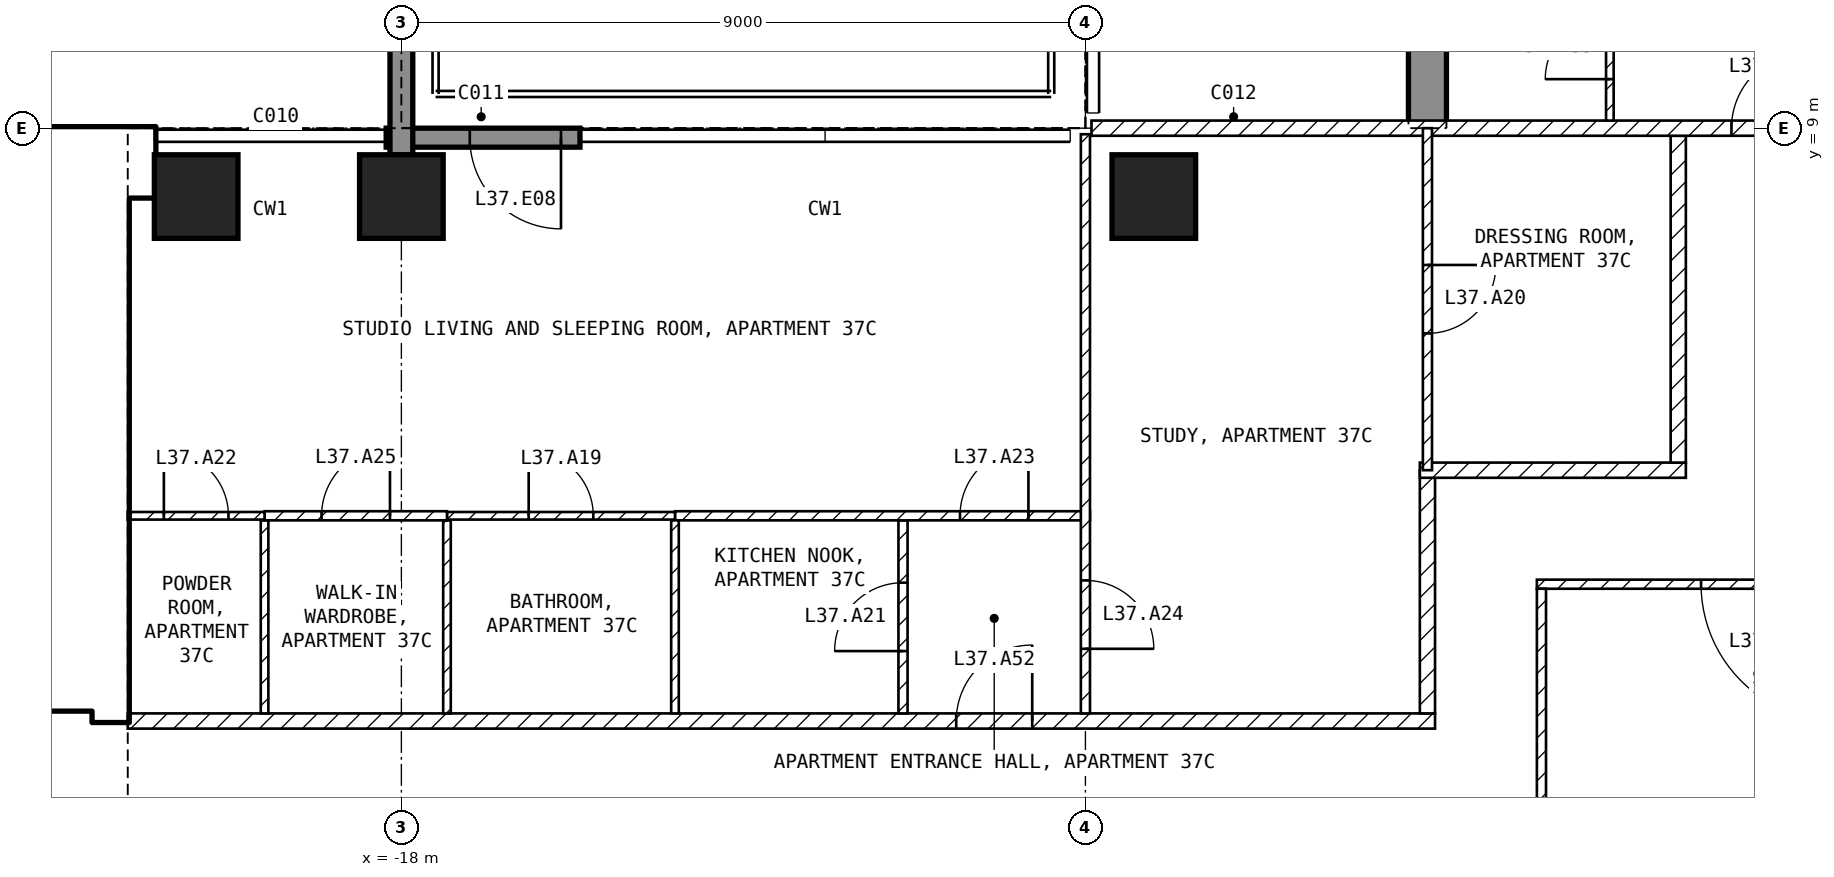
"""IFC4 building model, lengths in metres.
Left out: names, types, materials, properties, quantities, classifications, styles, units other than length and angle.
Written with IfcOpenShell. Run it as: python <this file> out.ifc"""

import sys

from ifc_helpers import new_model, si_unit, direction, frame, frame_2d, origin, origin_2d, place, context, subcontext, project, spatial, polyline, rectangle, outline, extrude, element, fill, save


model = new_model("IFC4")
c1 = context("Model", 3, precision=1e-05, world=origin(), true_north=direction((0.0, 1.0)))
c2 = subcontext(c1, "Body", "Model", "MODEL_VIEW")
j1 = project(units=[si_unit("LENGTHUNIT", "METRE"), si_unit("PLANEANGLEUNIT", "RADIAN")], contexts=[c1])
p1 = place(None, origin())
s1 = spatial("IfcSite", under=j1, at=p1, CompositionType="ELEMENT")
p2 = place(p1, origin())
s2 = spatial("IfcBuilding", under=s1, at=p2, CompositionType="ELEMENT")
p3 = place(p2, frame((0.0, 0.0, 151.4)))
s3 = spatial("IfcBuildingStorey", under=s2, at=p3, CompositionType="ELEMENT", Elevation=151.4)
for number, where, z_axis, x_axis in (
    (1, (-20.7, 8.1, -0.25), (0.0, 0.0, 1.0), (1.0, 0.0, 0.0)),
    (2, (-18.0, 8.1, -0.25), (0.0, 0.0, 1.0), (1.0, 0.0, 0.0)),
    (3, (-8.1, 8.1, -0.25), (0.0, 0.0, 1.0), (1.0, 0.0, 0.0)),
):
    element("IfcColumn", number, at=place(p3, frame(where, z_axis=z_axis, x_axis=x_axis)), inside=s3, PredefinedType="COLUMN", context=c2, shape_type="SweptSolid", body=[
        extrude(rectangle(XDim=1.1, YDim=1.1, at=origin_2d()), origin(), (0.0, 0.0, 1.0), 3.45),
    ])
p4 = place(p3, frame((-4.75, 9.0, -0.25), z_axis=(1.0, 0.0, 0.0), x_axis=(0.0, 1.0, 0.0)))
e4 = element("IfcWall", 4, at=p4, inside=s3, PredefinedType="SHEAR", context=c2, shape_type="SweptSolid", body=[
    extrude(outline(polyline([(0.0, 0.0), (2.1, 0.0), (2.1, 2.65), (4.5, 2.65), (4.5, 0.0), (9.9, 0.0), (9.9, 2.65), (12.3, 2.65), (12.3, 0.0), (16.55, 0.0), (16.55, 3.45), (0.0, 3.45), (0.0, 0.0)])), origin(), (0.0, 0.0, 1.0), 0.5),
])
p5 = place(p3, frame((-15.65, 8.875, 0.0), z_axis=(0.0, 0.0, 1.0), x_axis=(-1.0, 0.0, 0.0)))
e5 = element("IfcWall", 5, at=p5, inside=s3, PredefinedType="SOLIDWALL", context=c2, shape_type="SweptSolid", body=[
    extrude(rectangle(XDim=2.55, YDim=0.25, at=frame_2d((1.275, 0.0))), origin(), (0.0, 0.0, 1.0), 3.2),
])
p6 = place(p5, frame((0.25, 0.0, 0.0)))
e6 = element("IfcOpeningElement", 6, at=p6, cuts=e5, PredefinedType="OPENING", context=c2, shape_type="SweptSolid", body=[
    extrude(rectangle(XDim=1.2, YDim=2.4, at=frame_2d((0.6, 1.2))), frame((0.0, 0.135, 0.0), z_axis=(0.0, -1.0, 0.0), x_axis=(1.0, 0.0, 0.0)), (0.0, 0.0, 1.0), 0.27),
])
p7 = place(p3, frame((-18.0, 8.65, 0.0), z_axis=(0.0, 0.0, 1.0), x_axis=(0.0, 1.0, 0.0)))
e7 = element("IfcWall", 7, at=p7, inside=s3, PredefinedType="SOLIDWALL", context=c2, shape_type="SweptSolid", body=[
    extrude(rectangle(XDim=3.09, YDim=0.3, at=frame_2d((1.545, 0.0))), origin(), (0.0, 0.0, 1.0), 3.2),
])
p8 = place(p3, frame((-29.45, 8.55, 0.0), z_axis=(0.0, 0.0, 1.0), x_axis=(1.0, 0.0, 0.0)))
e8 = element("IfcWall", 8, at=p8, inside=s3, PredefinedType="SHEAR", context=c2, shape_type="SweptSolid", body=[
    extrude(rectangle(XDim=8.2, YDim=0.9, at=frame_2d((4.1, 0.0))), origin(), (0.0, 0.0, 1.0), 3.2),
])
p9 = place(p3, frame((-21.825, 1.2, 0.0), z_axis=(0.0, 0.0, 1.0), x_axis=(0.0, 1.0, 0.0)))
e9 = element("IfcWall", 9, at=p9, inside=s3, PredefinedType="SHEAR", context=c2, shape_type="SweptSolid", body=[
    extrude(rectangle(XDim=6.9, YDim=0.45, at=frame_2d((3.45, 0.0))), origin(), (0.0, 0.0, 1.0), 3.2),
])
p10 = place(p3, frame((-33.05, 1.45, 0.0), z_axis=(0.0, 0.0, 1.0), x_axis=(1.0, 0.0, 0.0)))
e10 = element("IfcWall", 10, at=p10, inside=s3, PredefinedType="SOLIDWALL", context=c2, shape_type="SweptSolid", body=[
    extrude(rectangle(XDim=11.0, YDim=0.2, at=frame_2d((5.5, 0.0))), origin(), (0.0, 0.0, 1.0), 3.2),
])
p11 = place(p10, frame((9.25, 0.0, 0.0)))
e11 = element("IfcOpeningElement", 11, at=p11, cuts=e10, PredefinedType="OPENING", context=c2, shape_type="SweptSolid", body=[
    extrude(rectangle(XDim=1.0, YDim=2.1, at=frame_2d((0.5, 1.05))), frame((0.0, 0.11, 0.0), z_axis=(0.0, -1.0, 0.0), x_axis=(1.0, 0.0, 0.0)), (0.0, 0.0, 1.0), 0.22),
])
p12 = place(p10, frame((6.75, 0.0, 0.0)))
e12 = element("IfcOpeningElement", 12, at=p12, cuts=e10, PredefinedType="OPENING", context=c2, shape_type="SweptSolid", body=[
    extrude(rectangle(XDim=1.0, YDim=2.1, at=frame_2d((0.5, 1.05))), frame((0.0, 0.11, 0.0), z_axis=(0.0, -1.0, 0.0), x_axis=(1.0, 0.0, 0.0)), (0.0, 0.0, 1.0), 0.22),
])
p13 = place(p10, frame((1.025, 0.0, 0.0)))
e13 = element("IfcOpeningElement", 13, at=p13, cuts=e10, PredefinedType="OPENING", context=c2, shape_type="SweptSolid", body=[
    extrude(rectangle(XDim=0.9, YDim=2.1, at=frame_2d((0.45, 1.05))), frame((0.0, 0.11, 0.0), z_axis=(0.0, -1.0, 0.0), x_axis=(1.0, 0.0, 0.0)), (0.0, 0.0, 1.0), 0.22),
])
p14 = place(p3, frame((-28.35, 5.15, 0.0), z_axis=(0.0, 0.0, 1.0), x_axis=(1.0, 0.0, 0.0)))
e14 = element("IfcWall", 14, at=p14, inside=s3, PredefinedType="SOLIDWALL", context=c2, shape_type="SweptSolid", body=[
    extrude(rectangle(XDim=6.3, YDim=0.2, at=frame_2d((3.15, 0.0))), origin(), (0.0, 0.0, 1.0), 3.2),
])
p15 = place(p14, frame((5.1, 0.0, 0.0)))
e15 = element("IfcOpeningElement", 15, at=p15, cuts=e14, PredefinedType="OPENING", context=c2, shape_type="SweptSolid", body=[
    extrude(rectangle(XDim=1.0, YDim=2.1, at=frame_2d((0.5, 1.05))), frame((0.0, 0.11, 0.0), z_axis=(0.0, -1.0, 0.0), x_axis=(1.0, 0.0, 0.0)), (0.0, 0.0, 1.0), 0.22),
])
p16 = place(p3, frame((3.06, 3.0, 0.0), z_axis=(0.0, 0.0, 1.0), x_axis=(-1.0, 0.0, 0.0)))
e16 = element("IfcWall", 16, at=p16, inside=s3, PredefinedType="PARTITIONING", context=c2, shape_type="SweptSolid", body=[
    extrude(rectangle(XDim=6.12, YDim=0.12, at=frame_2d((3.06, 0.0))), origin(), (0.0, 0.0, 1.0), 3.2),
])
p17 = place(p16, frame((2.16, 0.0, 0.0)))
e17 = element("IfcOpeningElement", 17, at=p17, cuts=e16, PredefinedType="OPENING", context=c2, shape_type="SweptSolid", body=[
    extrude(rectangle(XDim=1.8, YDim=2.1, at=frame_2d((0.9, 1.05))), frame((0.0, 0.07, 0.0), z_axis=(0.0, -1.0, 0.0), x_axis=(1.0, 0.0, 0.0)), (0.0, 0.0, 1.0), 0.14),
])
p18 = place(p3, frame((-3.0, 2.94, 0.0), z_axis=(0.0, 0.0, 1.0), x_axis=(0.0, -1.0, 0.0)))
e18 = element("IfcWall", 18, at=p18, inside=s3, PredefinedType="PARTITIONING", context=c2, shape_type="SweptSolid", body=[
    extrude(rectangle(XDim=5.88, YDim=0.12, at=frame_2d((2.94, 0.0))), origin(), (0.0, 0.0, 1.0), 3.2),
])
p19 = place(p3, frame((-21.6, 1.2, 0.0), z_axis=(0.0, 0.0, 1.0), x_axis=(1.0, 0.0, 0.0)))
e19 = element("IfcWall", 19, at=p19, inside=s3, PredefinedType="PARTITIONING", context=c2, shape_type="SweptSolid", body=[
    extrude(rectangle(XDim=17.2, YDim=0.2, at=frame_2d((8.6, 0.0))), origin(), (0.0, 0.0, 1.0), 3.2),
])
p20 = place(p19, frame((10.9, 0.0, 0.0)))
e20 = element("IfcOpeningElement", 20, at=p20, cuts=e19, PredefinedType="OPENING", context=c2, shape_type="SweptSolid", body=[
    extrude(rectangle(XDim=1.0, YDim=2.1, at=frame_2d((0.5, 1.05))), frame((0.0, 0.11, 0.0), z_axis=(0.0, -1.0, 0.0), x_axis=(1.0, 0.0, 0.0)), (0.0, 0.0, 1.0), 0.22),
])
p21 = place(p3, frame((-4.5, 1.3, 0.0), z_axis=(0.0, 0.0, 1.0), x_axis=(0.0, 1.0, 0.0)))
e21 = element("IfcWall", 21, at=p21, inside=s3, PredefinedType="PARTITIONING", context=c2, shape_type="SweptSolid", body=[
    extrude(rectangle(XDim=3.2, YDim=0.2, at=frame_2d((1.6, 0.0))), origin(), (0.0, 0.0, 1.0), 3.2),
])
p22 = place(p3, frame((-4.6, 4.5, 0.0), z_axis=(0.0, 0.0, 1.0), x_axis=(1.0, 0.0, 0.0)))
e22 = element("IfcWall", 22, at=p22, inside=s3, PredefinedType="PARTITIONING", context=c2, shape_type="SweptSolid", body=[
    extrude(rectangle(XDim=3.5, YDim=0.2, at=frame_2d((1.75, 0.0))), origin(), (0.0, 0.0, 1.0), 3.2),
])
p23 = place(p3, frame((-1.2, 4.6, 0.0), z_axis=(0.0, 0.0, 1.0), x_axis=(0.0, 1.0, 0.0)))
e23 = element("IfcWall", 23, at=p23, inside=s3, PredefinedType="PARTITIONING", context=c2, shape_type="SweptSolid", body=[
    extrude(rectangle(XDim=4.3, YDim=0.2, at=frame_2d((2.15, 0.0))), origin(), (0.0, 0.0, 1.0), 3.2),
])
p24 = place(p3, frame((-8.92, 9.0, 0.0), z_axis=(0.0, 0.0, 1.0), x_axis=(1.0, 0.0, 0.0)))
e24 = element("IfcWall", 24, at=p24, inside=s3, PredefinedType="PARTITIONING", context=c2, shape_type="SweptSolid", body=[
    extrude(rectangle(XDim=17.84, YDim=0.2, at=frame_2d((8.92, 0.0))), origin(), (0.0, 0.0, 1.0), 3.2),
])
p25 = place(p24, frame((8.42, 0.0, 0.0)))
e25 = element("IfcOpeningElement", 25, at=p25, cuts=e24, PredefinedType="OPENING", context=c2, shape_type="SweptSolid", body=[
    extrude(rectangle(XDim=1.0, YDim=2.1, at=frame_2d((0.5, 1.05))), frame((0.0, 0.11, 0.0), z_axis=(0.0, -1.0, 0.0), x_axis=(1.0, 0.0, 0.0)), (0.0, 0.0, 1.0), 0.22),
])
p26 = place(p3, frame((-11.4, 1.3, 0.0), z_axis=(0.0, 0.0, 1.0), x_axis=(0.0, 1.0, 0.0)))
e26 = element("IfcWall", 26, at=p26, inside=s3, PredefinedType="PARTITIONING", context=c2, shape_type="SweptSolid", body=[
    extrude(rectangle(XDim=2.54, YDim=0.12, at=frame_2d((1.27, 0.0))), origin(), (0.0, 0.0, 1.0), 3.2),
])
p27 = place(p26, frame((0.82, 0.0, 0.0)))
e27 = element("IfcOpeningElement", 27, at=p27, cuts=e26, PredefinedType="OPENING", context=c2, shape_type="SweptSolid", body=[
    extrude(rectangle(XDim=0.9, YDim=2.1, at=frame_2d((0.45, 1.05))), frame((0.0, 0.07, 0.0), z_axis=(0.0, -1.0, 0.0), x_axis=(1.0, 0.0, 0.0)), (0.0, 0.0, 1.0), 0.14),
])
p28 = place(p3, frame((-14.4, 3.9, 0.0), z_axis=(0.0, 0.0, 1.0), x_axis=(1.0, 0.0, 0.0)))
e28 = element("IfcWall", 28, at=p28, inside=s3, PredefinedType="PARTITIONING", context=c2, shape_type="SweptSolid", body=[
    extrude(rectangle(XDim=5.46, YDim=0.12, at=frame_2d((2.73, 0.0))), origin(), (0.0, 0.0, 1.0), 3.2),
])
p29 = place(p28, frame((3.75, 0.0, 0.0)))
e29 = element("IfcOpeningElement", 29, at=p29, cuts=e28, PredefinedType="OPENING", context=c2, shape_type="SweptSolid", body=[
    extrude(rectangle(XDim=0.9, YDim=2.1, at=frame_2d((0.45, 1.05))), frame((0.0, 0.07, 0.0), z_axis=(0.0, -1.0, 0.0), x_axis=(1.0, 0.0, 0.0)), (0.0, 0.0, 1.0), 0.14),
])
p30 = place(p3, frame((-9.0, 8.92, 0.0), z_axis=(0.0, 0.0, 1.0), x_axis=(0.0, -1.0, 0.0)))
e30 = element("IfcWall", 30, at=p30, inside=s3, PredefinedType="PARTITIONING", context=c2, shape_type="SweptSolid", body=[
    extrude(rectangle(XDim=7.62, YDim=0.12, at=frame_2d((3.81, 0.0))), origin(), (0.0, 0.0, 1.0), 3.2),
])
p31 = place(p30, frame((5.87, 0.0, 0.0)))
e31 = element("IfcOpeningElement", 31, at=p31, cuts=e30, PredefinedType="OPENING", context=c2, shape_type="SweptSolid", body=[
    extrude(rectangle(XDim=0.9, YDim=2.1, at=frame_2d((0.45, 1.05))), frame((0.0, 0.07, 0.0), z_axis=(0.0, -1.0, 0.0), x_axis=(1.0, 0.0, 0.0)), (0.0, 0.0, 1.0), 0.14),
])
for number, where, z_axis, x_axis in (
    (32, (-14.4, 1.3, 0.0), (0.0, 0.0, 1.0), (0.0, 1.0, 0.0)),
    (33, (-17.4, 1.3, 0.0), (0.0, 0.0, 1.0), (0.0, 1.0, 0.0)),
):
    element("IfcWall", number, at=place(p3, frame(where, z_axis=z_axis, x_axis=x_axis)), inside=s3, PredefinedType="PARTITIONING", context=c2, shape_type="SweptSolid", body=[
        extrude(rectangle(XDim=2.54, YDim=0.1, at=frame_2d((1.27, 0.0))), origin(), (0.0, 0.0, 1.0), 3.2),
    ])
p32 = place(p3, frame((-17.4, 3.9, 0.0), z_axis=(0.0, 0.0, 1.0), x_axis=(1.0, 0.0, 0.0)))
e34 = element("IfcWall", 34, at=p32, inside=s3, PredefinedType="PARTITIONING", context=c2, shape_type="SweptSolid", body=[
    extrude(rectangle(XDim=3.0, YDim=0.1, at=frame_2d((1.5, 0.0))), origin(), (0.0, 0.0, 1.0), 3.2),
])
p33 = place(p32, frame((1.075, 0.0, 0.0)))
e35 = element("IfcOpeningElement", 35, at=p33, cuts=e34, PredefinedType="OPENING", context=c2, shape_type="SweptSolid", body=[
    extrude(rectangle(XDim=0.85, YDim=2.1, at=frame_2d((0.425, 1.05))), frame((0.0, 0.06, 0.0), z_axis=(0.0, -1.0, 0.0), x_axis=(1.0, 0.0, 0.0)), (0.0, 0.0, 1.0), 0.12),
])
p34 = place(p3, frame((-19.8, 1.3, 0.0), z_axis=(0.0, 0.0, 1.0), x_axis=(0.0, 1.0, 0.0)))
e36 = element("IfcWall", 36, at=p34, inside=s3, PredefinedType="PARTITIONING", context=c2, shape_type="SweptSolid", body=[
    extrude(rectangle(XDim=2.54, YDim=0.1, at=frame_2d((1.27, 0.0))), origin(), (0.0, 0.0, 1.0), 3.2),
])
p35 = place(p3, frame((-19.8, 3.9, 0.0), z_axis=(0.0, 0.0, 1.0), x_axis=(1.0, 0.0, 0.0)))
e37 = element("IfcWall", 37, at=p35, inside=s3, PredefinedType="PARTITIONING", context=c2, shape_type="SweptSolid", body=[
    extrude(rectangle(XDim=2.4, YDim=0.12, at=frame_2d((1.2, 0.0))), origin(), (0.0, 0.0, 1.0), 3.2),
])
p36 = place(p35, frame((0.75, 0.0, 0.0)))
e38 = element("IfcOpeningElement", 38, at=p36, cuts=e37, PredefinedType="OPENING", context=c2, shape_type="SweptSolid", body=[
    extrude(rectangle(XDim=0.9, YDim=2.1, at=frame_2d((0.45, 1.05))), frame((0.0, 0.07, 0.0), z_axis=(0.0, -1.0, 0.0), x_axis=(1.0, 0.0, 0.0)), (0.0, 0.0, 1.0), 0.14),
])
p37 = place(p3, frame((-21.6, 3.9, 0.0), z_axis=(0.0, 0.0, 1.0), x_axis=(1.0, 0.0, 0.0)))
e39 = element("IfcWall", 39, at=p37, inside=s3, PredefinedType="PARTITIONING", context=c2, shape_type="SweptSolid", body=[
    extrude(rectangle(XDim=1.8, YDim=0.1, at=frame_2d((0.9, 0.0))), origin(), (0.0, 0.0, 1.0), 3.2),
])
p38 = place(p37, frame((0.475, 0.0, 0.0)))
e40 = element("IfcOpeningElement", 40, at=p38, cuts=e39, PredefinedType="OPENING", context=c2, shape_type="SweptSolid", body=[
    extrude(rectangle(XDim=0.85, YDim=2.1, at=frame_2d((0.425, 1.05))), frame((0.0, 0.06, 0.0), z_axis=(0.0, -1.0, 0.0), x_axis=(1.0, 0.0, 0.0)), (0.0, 0.0, 1.0), 0.12),
])
p39 = place(p3, frame((-4.5, 9.0, 0.0), z_axis=(0.0, 0.0, 1.0), x_axis=(0.0, -1.0, 0.0)))
e41 = element("IfcWall", 41, at=p39, inside=s3, PredefinedType="PARTITIONING", context=c2, shape_type="SweptSolid", body=[
    extrude(rectangle(XDim=4.5, YDim=0.12, at=frame_2d((2.25, 0.0))), origin(), (0.0, 0.0, 1.0), 3.2),
])
p40 = place(p39, frame((1.8, 0.0, 0.0)))
e42 = element("IfcOpeningElement", 42, at=p40, cuts=e41, PredefinedType="OPENING", context=c2, shape_type="SweptSolid", body=[
    extrude(rectangle(XDim=0.9, YDim=2.1, at=frame_2d((0.45, 1.05))), frame((0.0, 0.07, 0.0), z_axis=(0.0, -1.0, 0.0), x_axis=(1.0, 0.0, 0.0)), (0.0, 0.0, 1.0), 0.14),
])
p41 = place(p3, frame((-2.1, 9.1, 0.0), z_axis=(0.0, 0.0, 1.0), x_axis=(0.0, 1.0, 0.0)))
e43 = element("IfcWall", 43, at=p41, inside=s3, PredefinedType="PARTITIONING", context=c2, shape_type="SweptSolid", body=[
    extrude(rectangle(XDim=1.94, YDim=0.1, at=frame_2d((0.97, 0.0))), origin(), (0.0, 0.0, 1.0), 3.2),
])
p42 = place(p41, frame((0.545, 0.0, 0.0)))
e44 = element("IfcOpeningElement", 44, at=p42, cuts=e43, PredefinedType="OPENING", context=c2, shape_type="SweptSolid", body=[
    extrude(rectangle(XDim=0.85, YDim=2.1, at=frame_2d((0.425, 1.05))), frame((0.0, 0.06, 0.0), z_axis=(0.0, -1.0, 0.0), x_axis=(1.0, 0.0, 0.0)), (0.0, 0.0, 1.0), 0.12),
])
p43 = place(p6, origin())
e45 = element("IfcDoor", 45, at=p43, inside=s3, OperationType="SINGLE_SWING_LEFT", PredefinedType="DOOR", context=c2, shape_type="SweptSolid", body=[
    extrude(rectangle(XDim=1.2, YDim=2.4, at=frame_2d((0.6, 1.2))), frame((0.0, 0.025, 0.0), z_axis=(0.0, -1.0, 0.0), x_axis=(1.0, 0.0, 0.0)), (0.0, 0.0, 1.0), 0.05),
])
fill(e6, e45)
p44 = place(p15, origin())
e46 = element("IfcDoor", 46, at=p44, inside=s3, OperationType="SINGLE_SWING_LEFT", PredefinedType="DOOR", context=c2, shape_type="SweptSolid", body=[
    extrude(rectangle(XDim=1.0, YDim=2.1, at=frame_2d((0.5, 1.05))), frame((0.0, 0.025, 0.0), z_axis=(0.0, -1.0, 0.0), x_axis=(1.0, 0.0, 0.0)), (0.0, 0.0, 1.0), 0.05),
])
fill(e15, e46)
p45 = place(p17, origin())
e47 = element("IfcDoor", 47, at=p45, inside=s3, OperationType="SINGLE_SWING_LEFT", PredefinedType="DOOR", context=c2, shape_type="SweptSolid", body=[
    extrude(rectangle(XDim=1.8, YDim=2.1, at=frame_2d((0.9, 1.05))), frame((0.0, 0.025, 0.0), z_axis=(0.0, -1.0, 0.0), x_axis=(1.0, 0.0, 0.0)), (0.0, 0.0, 1.0), 0.05),
])
fill(e17, e47)
p46 = place(p33, origin())
e48 = element("IfcDoor", 48, at=p46, inside=s3, OperationType="SINGLE_SWING_LEFT", PredefinedType="DOOR", context=c2, shape_type="SweptSolid", body=[
    extrude(rectangle(XDim=0.85, YDim=2.1, at=frame_2d((0.425, 1.05))), frame((0.0, 0.025, 0.0), z_axis=(0.0, -1.0, 0.0), x_axis=(1.0, 0.0, 0.0)), (0.0, 0.0, 1.0), 0.05),
])
fill(e35, e48)
p47 = place(p40, origin())
e49 = element("IfcDoor", 49, at=p47, inside=s3, OperationType="SINGLE_SWING_LEFT", PredefinedType="DOOR", context=c2, shape_type="SweptSolid", body=[
    extrude(rectangle(XDim=0.9, YDim=2.1, at=frame_2d((0.45, 1.05))), frame((0.0, 0.025, 0.0), z_axis=(0.0, -1.0, 0.0), x_axis=(1.0, 0.0, 0.0)), (0.0, 0.0, 1.0), 0.05),
])
fill(e42, e49)
p48 = place(p27, origin())
e50 = element("IfcDoor", 50, at=p48, inside=s3, OperationType="SINGLE_SWING_LEFT", PredefinedType="DOOR", context=c2, shape_type="SweptSolid", body=[
    extrude(rectangle(XDim=0.9, YDim=2.1, at=frame_2d((0.45, 1.05))), frame((0.0, 0.025, 0.0), z_axis=(0.0, -1.0, 0.0), x_axis=(1.0, 0.0, 0.0)), (0.0, 0.0, 1.0), 0.05),
])
fill(e27, e50)
p49 = place(p38, origin())
e51 = element("IfcDoor", 51, at=p49, inside=s3, OperationType="SINGLE_SWING_LEFT", PredefinedType="DOOR", context=c2, shape_type="SweptSolid", body=[
    extrude(rectangle(XDim=0.85, YDim=2.1, at=frame_2d((0.425, 1.05))), frame((0.0, 0.025, 0.0), z_axis=(0.0, -1.0, 0.0), x_axis=(1.0, 0.0, 0.0)), (0.0, 0.0, 1.0), 0.05),
])
fill(e40, e51)
p50 = place(p29, origin())
e52 = element("IfcDoor", 52, at=p50, inside=s3, OperationType="SINGLE_SWING_RIGHT", PredefinedType="DOOR", context=c2, shape_type="SweptSolid", body=[
    extrude(rectangle(XDim=0.9, YDim=2.1, at=frame_2d((0.45, 1.05))), frame((0.0, 0.025, 0.0), z_axis=(0.0, -1.0, 0.0), x_axis=(1.0, 0.0, 0.0)), (0.0, 0.0, 1.0), 0.05),
])
fill(e29, e52)
p51 = place(p31, origin())
e53 = element("IfcDoor", 53, at=p51, inside=s3, OperationType="SINGLE_SWING_RIGHT", PredefinedType="DOOR", context=c2, shape_type="SweptSolid", body=[
    extrude(rectangle(XDim=0.9, YDim=2.1, at=frame_2d((0.45, 1.05))), frame((0.0, 0.025, 0.0), z_axis=(0.0, -1.0, 0.0), x_axis=(1.0, 0.0, 0.0)), (0.0, 0.0, 1.0), 0.05),
])
fill(e31, e53)
p52 = place(p36, origin())
e54 = element("IfcDoor", 54, at=p52, inside=s3, OperationType="SINGLE_SWING_RIGHT", PredefinedType="DOOR", context=c2, shape_type="SweptSolid", body=[
    extrude(rectangle(XDim=0.9, YDim=2.1, at=frame_2d((0.45, 1.05))), frame((0.0, 0.025, 0.0), z_axis=(0.0, -1.0, 0.0), x_axis=(1.0, 0.0, 0.0)), (0.0, 0.0, 1.0), 0.05),
])
fill(e38, e54)
p53 = place(p25, origin())
e55 = element("IfcDoor", 55, at=p53, inside=s3, OperationType="SINGLE_SWING_RIGHT", PredefinedType="DOOR", context=c2, shape_type="SweptSolid", body=[
    extrude(rectangle(XDim=1.0, YDim=2.1, at=frame_2d((0.5, 1.05))), frame((0.0, 0.025, 0.0), z_axis=(0.0, -1.0, 0.0), x_axis=(1.0, 0.0, 0.0)), (0.0, 0.0, 1.0), 0.05),
])
fill(e25, e55)
p54 = place(p42, origin())
e56 = element("IfcDoor", 56, at=p54, inside=s3, OperationType="SINGLE_SWING_LEFT", PredefinedType="DOOR", context=c2, shape_type="SweptSolid", body=[
    extrude(rectangle(XDim=0.85, YDim=2.1, at=frame_2d((0.425, 1.05))), frame((0.0, 0.025, 0.0), z_axis=(0.0, -1.0, 0.0), x_axis=(1.0, 0.0, 0.0)), (0.0, 0.0, 1.0), 0.05),
])
fill(e44, e56)
p55 = place(p20, origin())
e57 = element("IfcDoor", 57, at=p55, inside=s3, OperationType="SINGLE_SWING_RIGHT", PredefinedType="DOOR", context=c2, shape_type="SweptSolid", body=[
    extrude(rectangle(XDim=1.0, YDim=2.1, at=frame_2d((0.5, 1.05))), frame((0.0, 0.025, 0.0), z_axis=(0.0, -1.0, 0.0), x_axis=(1.0, 0.0, 0.0)), (0.0, 0.0, 1.0), 0.05),
])
fill(e20, e57)
save(model, sys.argv[1])
